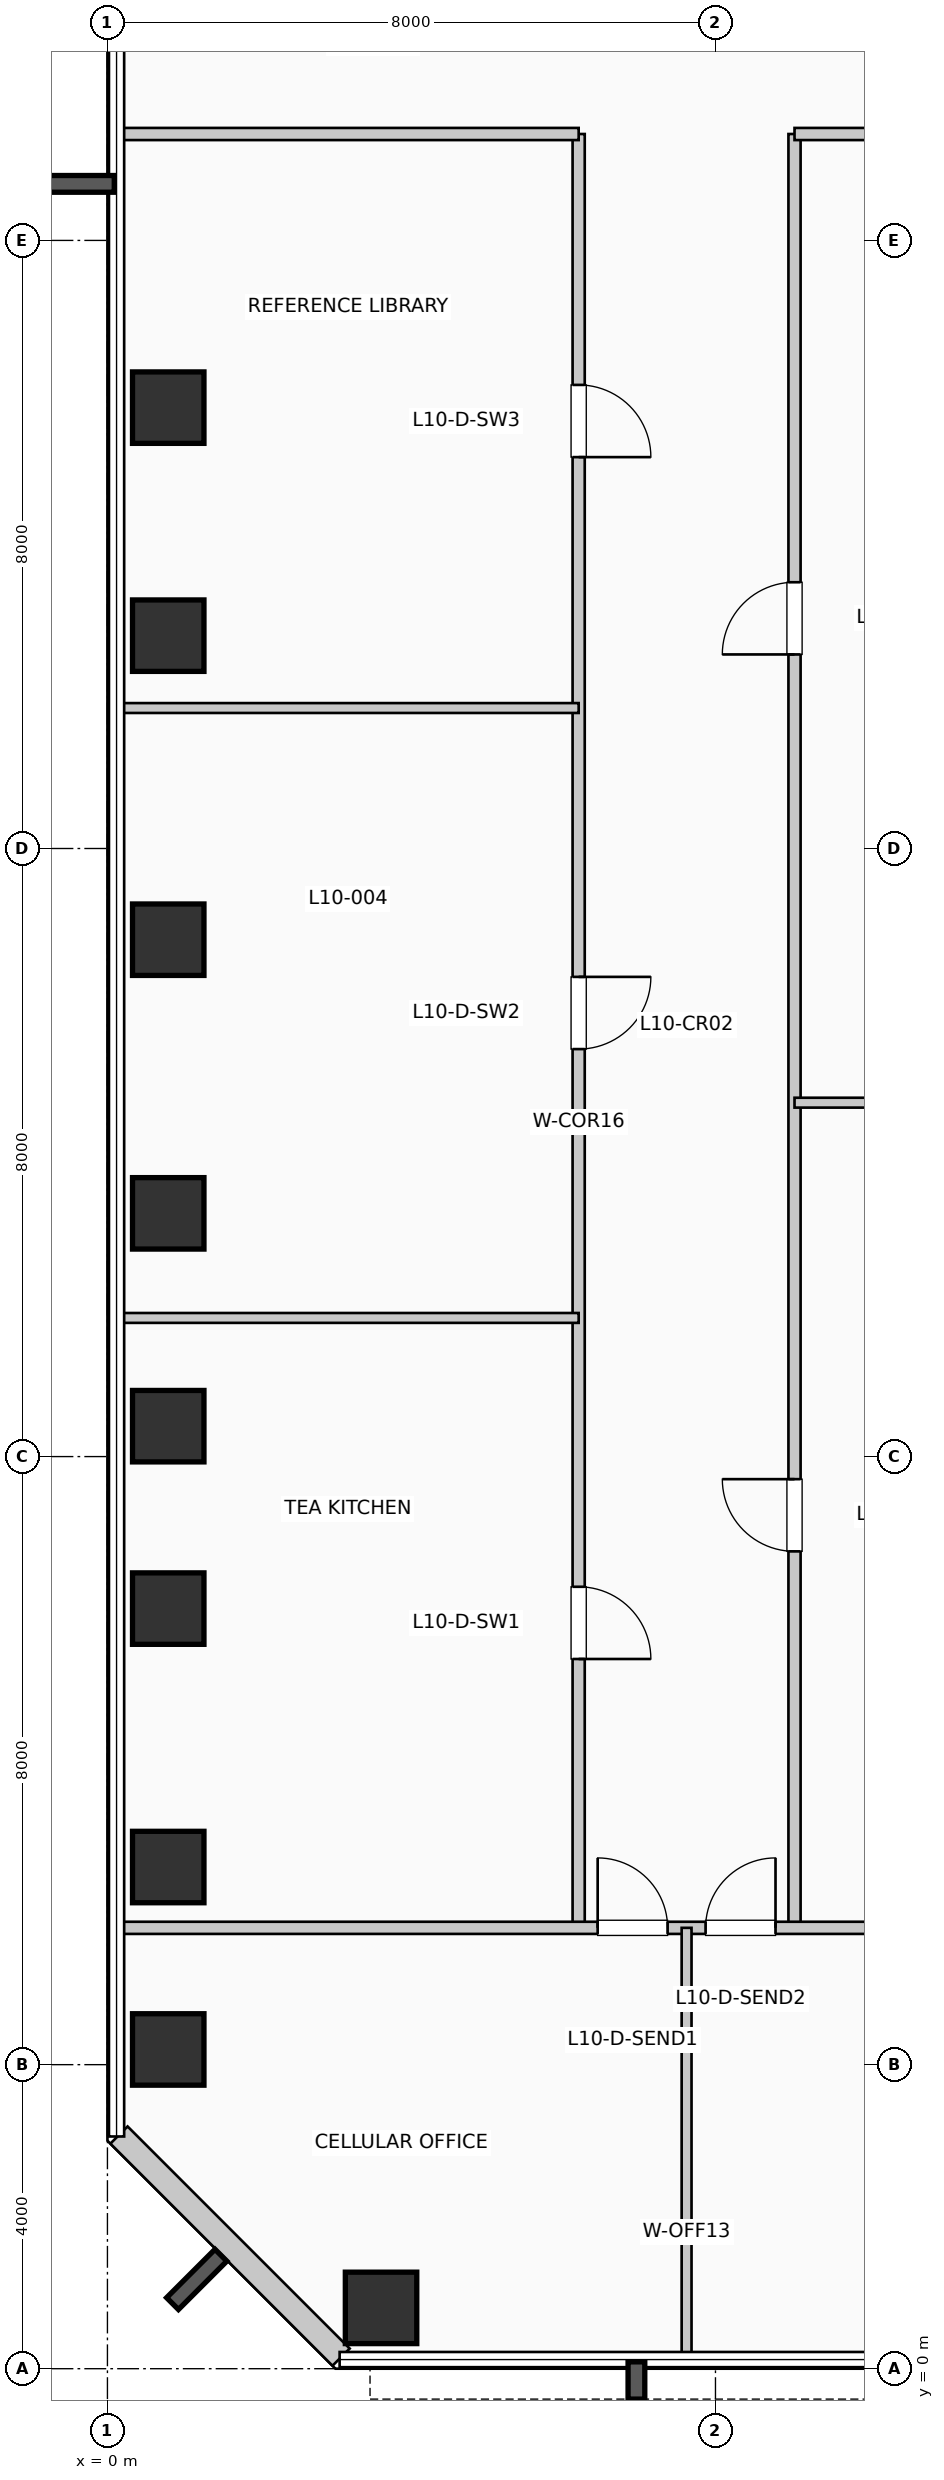
"""IFC4 building model, lengths in metres.
Left out: names, types, materials, properties, quantities, classifications, styles, units other than length and angle.
Written with IfcOpenShell. Run it as: python <this file> out.ifc"""

import sys

from ifc_helpers import new_model, si_unit, direction, frame, frame_2d, origin, origin_2d, place, context, subcontext, project, spatial, rectangle, extrude, element, fill, save


model = new_model("IFC4")
c1 = context("Model", 3, precision=1e-05, world=origin(), true_north=direction((0.0, 1.0)))
c2 = subcontext(c1, "Body", "Model", "MODEL_VIEW")
j1 = project(units=[si_unit("LENGTHUNIT", "METRE"), si_unit("PLANEANGLEUNIT", "RADIAN")], contexts=[c1])
p1 = place(None, origin())
s1 = spatial("IfcSite", under=j1, at=p1, CompositionType="ELEMENT")
p2 = place(p1, origin())
s2 = spatial("IfcBuilding", under=s1, at=p2, CompositionType="ELEMENT")
p3 = place(p2, frame((0.0, 0.0, 46.2)))
s3 = spatial("IfcBuildingStorey", under=s2, at=p3, CompositionType="ELEMENT", Elevation=46.2)
for number, where, z_axis, x_axis in (
    (1, (0.8, 4.2, 0.0), (0.0, 0.0, 1.0), (1.0, 0.0, 0.0)),
    (2, (0.8, 6.6, 0.0), (0.0, 0.0, 1.0), (1.0, 0.0, 0.0)),
    (3, (0.8, 10.0, 0.0), (0.0, 0.0, 1.0), (1.0, 0.0, 0.0)),
    (4, (0.8, 12.4, 0.0), (0.0, 0.0, 1.0), (1.0, 0.0, 0.0)),
    (5, (0.8, 15.2, 0.0), (0.0, 0.0, 1.0), (1.0, 0.0, 0.0)),
    (6, (0.8, 18.8, 0.0), (0.0, 0.0, 1.0), (1.0, 0.0, 0.0)),
    (7, (0.8, 22.8, 0.0), (0.0, 0.0, 1.0), (1.0, 0.0, 0.0)),
    (8, (0.8, 25.8, 0.0), (0.0, 0.0, 1.0), (1.0, 0.0, 0.0)),
    (9, (3.6, 0.8, 0.0), (0.0, 0.0, 1.0), (1.0, 0.0, 0.0)),
):
    element("IfcColumn", number, at=place(p3, frame(where, z_axis=z_axis, x_axis=x_axis)), inside=s3, PredefinedType="COLUMN", context=c2, shape_type="SweptSolid", body=[
        extrude(rectangle(XDim=0.94, YDim=0.94, at=origin_2d()), origin(), (0.0, 0.0, 1.0), 3.96),
    ])
p4 = place(p3, frame((0.152, 3.074, 0.0), z_axis=(0.0, 0.0, 1.0), x_axis=(0.707106781187, -0.707106781187, 0.0)))
e10 = element("IfcWall", 10, at=p4, inside=s3, PredefinedType="SOLIDWALL", context=c2, shape_type="SweptSolid", body=[
    extrude(rectangle(XDim=4.133, YDim=0.32, at=frame_2d((2.066, 0.0))), origin(), (0.0, 0.0, 1.0), 3.71),
])
p5 = place(p3, frame((6.2, 5.8, 0.0), z_axis=(0.0, 0.0, 1.0), x_axis=(0.0, 1.0, 0.0)))
e11 = element("IfcWall", 11, at=p5, inside=s3, PredefinedType="PARTITIONING", context=c2, shape_type="SweptSolid", body=[
    extrude(rectangle(XDim=23.6, YDim=0.16, at=frame_2d((11.8, 0.0))), origin(), (0.0, 0.0, 1.0), 3.71),
])
p6 = place(p5, frame((4.487, 0.0, 0.0), z_axis=(0.0, 0.0, 1.0), x_axis=(-1.0, 0.0, 0.0)))
e12 = element("IfcOpeningElement", 12, at=p6, cuts=e11, PredefinedType="OPENING", context=c2, shape_type="SweptSolid", body=[
    extrude(rectangle(XDim=0.95, YDim=2.15, at=frame_2d((0.475, 1.075))), frame((0.0, 0.09, 0.0), z_axis=(0.0, -1.0, 0.0), x_axis=(1.0, 0.0, 0.0)), (0.0, 0.0, 1.0), 0.18),
])
p7 = place(p5, frame((12.511, 0.0, 0.0), z_axis=(0.0, 0.0, 1.0), x_axis=(-1.0, 0.0, 0.0)))
e13 = element("IfcOpeningElement", 13, at=p7, cuts=e11, PredefinedType="OPENING", context=c2, shape_type="SweptSolid", body=[
    extrude(rectangle(XDim=0.95, YDim=2.15, at=frame_2d((0.475, 1.075))), frame((0.0, 0.09, 0.0), z_axis=(0.0, -1.0, 0.0), x_axis=(1.0, 0.0, 0.0)), (0.0, 0.0, 1.0), 0.18),
])
p8 = place(p5, frame((20.299, 0.0, 0.0), z_axis=(0.0, 0.0, 1.0), x_axis=(-1.0, 0.0, 0.0)))
e14 = element("IfcOpeningElement", 14, at=p8, cuts=e11, PredefinedType="OPENING", context=c2, shape_type="SweptSolid", body=[
    extrude(rectangle(XDim=0.95, YDim=2.15, at=frame_2d((0.475, 1.075))), frame((0.0, 0.09, 0.0), z_axis=(0.0, -1.0, 0.0), x_axis=(1.0, 0.0, 0.0)), (0.0, 0.0, 1.0), 0.18),
])
p9 = place(p3, frame((9.04, 5.8, 0.0), z_axis=(0.0, 0.0, 1.0), x_axis=(0.0, 1.0, 0.0)))
e15 = element("IfcWall", 15, at=p9, inside=s3, PredefinedType="PARTITIONING", context=c2, shape_type="SweptSolid", body=[
    extrude(rectangle(XDim=23.6, YDim=0.16, at=frame_2d((11.8, 0.0))), origin(), (0.0, 0.0, 1.0), 3.71),
])
p10 = place(p9, frame((4.953, 0.0, 0.0)))
e16 = element("IfcOpeningElement", 16, at=p10, cuts=e15, PredefinedType="OPENING", context=c2, shape_type="SweptSolid", body=[
    extrude(rectangle(XDim=0.95, YDim=2.15, at=frame_2d((0.475, 1.075))), frame((0.0, 0.09, 0.0), z_axis=(0.0, -1.0, 0.0), x_axis=(1.0, 0.0, 0.0)), (0.0, 0.0, 1.0), 0.18),
])
p11 = place(p9, frame((16.753, 0.0, 0.0)))
e17 = element("IfcOpeningElement", 17, at=p11, cuts=e15, PredefinedType="OPENING", context=c2, shape_type="SweptSolid", body=[
    extrude(rectangle(XDim=0.95, YDim=2.15, at=frame_2d((0.475, 1.075))), frame((0.0, 0.09, 0.0), z_axis=(0.0, -1.0, 0.0), x_axis=(1.0, 0.0, 0.0)), (0.0, 0.0, 1.0), 0.18),
])
p12 = place(p3, frame((0.19, 5.8, 0.0), z_axis=(0.0, 0.0, 1.0), x_axis=(1.0, 0.0, 0.0)))
e18 = element("IfcWall", 18, at=p12, inside=s3, PredefinedType="PARTITIONING", context=c2, shape_type="SweptSolid", body=[
    extrude(rectangle(XDim=23.26, YDim=0.16, at=frame_2d((11.63, 0.0))), origin(), (0.0, 0.0, 1.0), 3.71),
])
p13 = place(p12, frame((6.26, 0.0, 0.0)))
e19 = element("IfcOpeningElement", 19, at=p13, cuts=e18, PredefinedType="OPENING", context=c2, shape_type="SweptSolid", body=[
    extrude(rectangle(XDim=0.92, YDim=2.1, at=frame_2d((0.46, 1.05))), frame((0.0, 0.09, 0.0), z_axis=(0.0, -1.0, 0.0), x_axis=(1.0, 0.0, 0.0)), (0.0, 0.0, 1.0), 0.18),
])
p14 = place(p12, frame((7.68, 0.0, 0.0)))
e20 = element("IfcOpeningElement", 20, at=p14, cuts=e18, PredefinedType="OPENING", context=c2, shape_type="SweptSolid", body=[
    extrude(rectangle(XDim=0.92, YDim=2.1, at=frame_2d((0.46, 1.05))), frame((0.0, 0.09, 0.0), z_axis=(0.0, -1.0, 0.0), x_axis=(1.0, 0.0, 0.0)), (0.0, 0.0, 1.0), 0.18),
])
p15 = place(p3, frame((0.19, 29.4, 0.0), z_axis=(0.0, 0.0, 1.0), x_axis=(1.0, 0.0, 0.0)))
e21 = element("IfcWall", 21, at=p15, inside=s3, PredefinedType="PARTITIONING", context=c2, shape_type="SweptSolid", body=[
    extrude(rectangle(XDim=6.01, YDim=0.16, at=frame_2d((3.005, 0.0))), origin(), (0.0, 0.0, 1.0), 3.365),
])
p16 = place(p3, frame((9.04, 29.4, 0.0), z_axis=(0.0, 0.0, 1.0), x_axis=(1.0, 0.0, 0.0)))
e22 = element("IfcWall", 22, at=p16, inside=s3, PredefinedType="PARTITIONING", context=c2, shape_type="SweptSolid", body=[
    extrude(rectangle(XDim=14.41, YDim=0.16, at=frame_2d((7.205, 0.0))), origin(), (0.0, 0.0, 1.0), 3.365),
])
p17 = place(p3, frame((7.62, 0.19, 0.0), z_axis=(0.0, 0.0, 1.0), x_axis=(0.0, 1.0, 0.0)))
e23 = element("IfcWall", 23, at=p17, inside=s3, PredefinedType="PARTITIONING", context=c2, shape_type="SweptSolid", body=[
    extrude(rectangle(XDim=5.61, YDim=0.13, at=frame_2d((2.805, 0.0))), origin(), (0.0, 0.0, 1.0), 3.71),
])
for number, where, z_axis, x_axis in (
    (24, (0.19, 13.824, 0.0), (0.0, 0.0, 1.0), (1.0, 0.0, 0.0)),
    (25, (0.19, 21.848, 0.0), (0.0, 0.0, 1.0), (1.0, 0.0, 0.0)),
):
    element("IfcWall", number, at=place(p3, frame(where, z_axis=z_axis, x_axis=x_axis)), inside=s3, PredefinedType="PARTITIONING", context=c2, shape_type="SweptSolid", body=[
        extrude(rectangle(XDim=6.01, YDim=0.13, at=frame_2d((3.005, 0.0))), origin(), (0.0, 0.0, 1.0), 3.71),
    ])
p18 = place(p3, frame((9.04, 16.656, 0.0), z_axis=(0.0, 0.0, 1.0), x_axis=(1.0, 0.0, 0.0)))
e26 = element("IfcWall", 26, at=p18, inside=s3, PredefinedType="PARTITIONING", context=c2, shape_type="SweptSolid", body=[
    extrude(rectangle(XDim=14.41, YDim=0.13, at=frame_2d((7.205, 0.0))), origin(), (0.0, 0.0, 1.0), 3.71),
])
p19 = place(p13, origin())
e27 = element("IfcDoor", 27, at=p19, inside=s3, OperationType="SINGLE_SWING_LEFT", PredefinedType="DOOR", context=c2, shape_type="SweptSolid", body=[
    extrude(rectangle(XDim=0.92, YDim=2.1, at=frame_2d((0.46, 1.05))), frame((0.0, 0.025, 0.0), z_axis=(0.0, -1.0, 0.0), x_axis=(1.0, 0.0, 0.0)), (0.0, 0.0, 1.0), 0.05),
])
fill(e19, e27)
p20 = place(p14, origin())
e28 = element("IfcDoor", 28, at=p20, inside=s3, OperationType="SINGLE_SWING_RIGHT", PredefinedType="DOOR", context=c2, shape_type="SweptSolid", body=[
    extrude(rectangle(XDim=0.92, YDim=2.1, at=frame_2d((0.46, 1.05))), frame((0.0, 0.025, 0.0), z_axis=(0.0, -1.0, 0.0), x_axis=(1.0, 0.0, 0.0)), (0.0, 0.0, 1.0), 0.05),
])
fill(e20, e28)
p21 = place(p6, origin())
e29 = element("IfcDoor", 29, at=p21, inside=s3, OperationType="SINGLE_SWING_LEFT", PredefinedType="DOOR", context=c2, shape_type="SweptSolid", body=[
    extrude(rectangle(XDim=0.95, YDim=2.15, at=frame_2d((0.475, 1.075))), frame((0.0, 0.025, 0.0), z_axis=(0.0, -1.0, 0.0), x_axis=(1.0, 0.0, 0.0)), (0.0, 0.0, 1.0), 0.05),
])
fill(e12, e29)
p22 = place(p7, origin())
e30 = element("IfcDoor", 30, at=p22, inside=s3, OperationType="SINGLE_SWING_RIGHT", PredefinedType="DOOR", context=c2, shape_type="SweptSolid", body=[
    extrude(rectangle(XDim=0.95, YDim=2.15, at=frame_2d((0.475, 1.075))), frame((0.0, 0.025, 0.0), z_axis=(0.0, -1.0, 0.0), x_axis=(1.0, 0.0, 0.0)), (0.0, 0.0, 1.0), 0.05),
])
fill(e13, e30)
p23 = place(p8, origin())
e31 = element("IfcDoor", 31, at=p23, inside=s3, OperationType="SINGLE_SWING_LEFT", PredefinedType="DOOR", context=c2, shape_type="SweptSolid", body=[
    extrude(rectangle(XDim=0.95, YDim=2.15, at=frame_2d((0.475, 1.075))), frame((0.0, 0.025, 0.0), z_axis=(0.0, -1.0, 0.0), x_axis=(1.0, 0.0, 0.0)), (0.0, 0.0, 1.0), 0.05),
])
fill(e14, e31)
p24 = place(p10, origin())
e32 = element("IfcDoor", 32, at=p24, inside=s3, OperationType="SINGLE_SWING_RIGHT", PredefinedType="DOOR", context=c2, shape_type="SweptSolid", body=[
    extrude(rectangle(XDim=0.95, YDim=2.15, at=frame_2d((0.475, 1.075))), frame((0.0, 0.025, 0.0), z_axis=(0.0, -1.0, 0.0), x_axis=(1.0, 0.0, 0.0)), (0.0, 0.0, 1.0), 0.05),
])
fill(e16, e32)
p25 = place(p11, origin())
e33 = element("IfcDoor", 33, at=p25, inside=s3, OperationType="SINGLE_SWING_LEFT", PredefinedType="DOOR", context=c2, shape_type="SweptSolid", body=[
    extrude(rectangle(XDim=0.95, YDim=2.15, at=frame_2d((0.475, 1.075))), frame((0.0, 0.025, 0.0), z_axis=(0.0, -1.0, 0.0), x_axis=(1.0, 0.0, 0.0)), (0.0, 0.0, 1.0), 0.05),
])
fill(e17, e33)
save(model, sys.argv[1])
